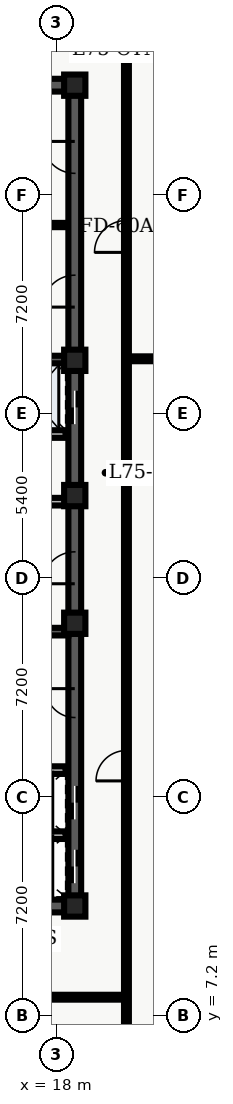
"""IFC4 building model, lengths in metres.
Left out: names, types, materials, properties, quantities, classifications, styles, units other than length and angle.
Written with IfcOpenShell. Run it as: python <this file> out.ifc"""

import sys

from ifc_helpers import new_model, entity, si_unit, converted_unit, direction, frame, origin_with_axes, origin_2d_with_axis, place, context, subcontext, project, spatial, polyline, rectangle, outline, extrude, element, fill, save


model = new_model("IFC4")
c1 = context("Model", 3, precision=1e-05, world=origin_with_axes(), true_north=direction((0.0, 1.0)))
c2 = subcontext(c1, "Body", "Model", "MODEL_VIEW")
j1 = project(units=[si_unit("LENGTHUNIT", "METRE"), converted_unit("PLANEANGLEUNIT", "DEGREE", entity("IfcPlaneAngleMeasure", 0.017), si_unit("PLANEANGLEUNIT", "RADIAN"), dimensions=[0, 0, 0, 0, 0, 0, 0])], contexts=[c1])
p1 = place(None, origin_with_axes())
s1 = spatial("IfcSite", under=j1, at=p1, CompositionType="ELEMENT")
p2 = place(p1, origin_with_axes())
s2 = spatial("IfcBuilding", under=s1, at=p2, CompositionType="ELEMENT")
p3 = place(p2, frame((0.0, 0.0, 303.6), z_axis=(0.0, 0.0, 1.0), x_axis=(1.0, 0.0, 0.0)))
s3 = spatial("IfcBuildingStorey", under=s2, at=p3, CompositionType="ELEMENT", Elevation=303.6)
p4 = place(p3, frame((11.4, 10.8, 0.0), z_axis=(0.0, 0.0, 1.0), x_axis=(1.0, 0.0, 0.0)))
e1 = element("IfcWall", 1, at=p4, inside=s3, PredefinedType="SHEAR", context=c2, shape_type="SweptSolid", body=[
    extrude(outline(polyline([(0.0, -0.21), (7.2, -0.21), (7.2, 0.21), (0.0, 0.21), (0.0, -0.21)])), origin_with_axes(), (0.0, 0.0, 1.0), 4.84),
])
p5 = place(p4, frame((2.625, 0.0, 0.0), z_axis=(0.0, 0.0, 1.0), x_axis=(1.0, 0.0, 0.0)))
e2 = element("IfcOpeningElement", 2, at=p5, cuts=e1, PredefinedType="OPENING", context=c2, shape_type="SweptSolid", body=[
    extrude(rectangle(XDim=1.05, YDim=0.44, at=origin_2d_with_axis()), origin_with_axes(), (0.0, 0.0, 1.0), 2.15),
])
p6 = place(p3, frame((11.4, 37.8, 0.0), z_axis=(0.0, 0.0, 1.0), x_axis=(1.0, 0.0, 0.0)))
e3 = element("IfcWall", 3, at=p6, inside=s3, PredefinedType="SHEAR", context=c2, shape_type="SweptSolid", body=[
    extrude(outline(polyline([(0.0, -0.21), (7.2, -0.21), (7.2, 0.21), (0.0, 0.21), (0.0, -0.21)])), origin_with_axes(), (0.0, 0.0, 1.0), 4.84),
])
p7 = place(p6, frame((2.625, 0.0, 0.0), z_axis=(0.0, 0.0, 1.0), x_axis=(1.0, 0.0, 0.0)))
e4 = element("IfcOpeningElement", 4, at=p7, cuts=e3, PredefinedType="OPENING", context=c2, shape_type="SweptSolid", body=[
    extrude(rectangle(XDim=1.05, YDim=0.44, at=origin_2d_with_axis()), origin_with_axes(), (0.0, 0.0, 1.0), 2.15),
])
p8 = place(p3, frame((18.6, 10.8, 0.0), z_axis=(0.0, 0.0, 1.0), x_axis=(0.0, 1.0, 0.0)))
e5 = element("IfcWall", 5, at=p8, inside=s3, PredefinedType="SHEAR", context=c2, shape_type="SweptSolid", body=[
    extrude(outline(polyline([(0.0, -0.21), (13.5, -0.21), (13.5, 0.21), (0.0, 0.21), (0.0, -0.21)])), origin_with_axes(), (0.0, 0.0, 1.0), 4.84),
])
p9 = place(p8, frame((1.3, 0.0, 0.0), z_axis=(0.0, 0.0, 1.0), x_axis=(1.0, 0.0, 0.0)))
e6 = element("IfcOpeningElement", 6, at=p9, cuts=e5, PredefinedType="OPENING", context=c2, shape_type="SweptSolid", body=[
    extrude(rectangle(XDim=1.1, YDim=0.44, at=origin_2d_with_axis()), origin_with_axes(), (0.0, 0.0, 1.0), 2.15),
])
p10 = place(p8, frame((3.4, 0.0, 0.0), z_axis=(0.0, 0.0, 1.0), x_axis=(1.0, 0.0, 0.0)))
e7 = element("IfcOpeningElement", 7, at=p10, cuts=e5, PredefinedType="OPENING", context=c2, shape_type="SweptSolid", body=[
    extrude(rectangle(XDim=1.1, YDim=0.44, at=origin_2d_with_axis()), origin_with_axes(), (0.0, 0.0, 1.0), 2.15),
])
p11 = place(p8, frame((11.125, 0.0, 0.0), z_axis=(0.0, 0.0, 1.0), x_axis=(1.0, 0.0, 0.0)))
e8 = element("IfcOpeningElement", 8, at=p11, cuts=e5, PredefinedType="OPENING", context=c2, shape_type="SweptSolid", body=[
    extrude(rectangle(XDim=1.05, YDim=0.44, at=origin_2d_with_axis()), origin_with_axes(), (0.0, 0.0, 1.0), 2.15),
])
p12 = place(p8, frame((6.675, 0.0, 0.0), z_axis=(0.0, 0.0, 1.0), x_axis=(1.0, 0.0, 0.0)))
e9 = element("IfcOpeningElement", 9, at=p12, cuts=e5, PredefinedType="OPENING", context=c2, shape_type="SweptSolid", body=[
    extrude(rectangle(XDim=0.95, YDim=0.44, at=origin_2d_with_axis()), origin_with_axes(), (0.0, 0.0, 1.0), 2.15),
])
p13 = place(p3, frame((18.6, 24.3, 0.0), z_axis=(0.0, 0.0, 1.0), x_axis=(0.0, 1.0, 0.0)))
e10 = element("IfcWall", 10, at=p13, inside=s3, PredefinedType="SHEAR", context=c2, shape_type="SweptSolid", body=[
    extrude(outline(polyline([(0.0, -0.21), (13.5, -0.21), (13.5, 0.21), (0.0, 0.21), (0.0, -0.21)])), origin_with_axes(), (0.0, 0.0, 1.0), 4.84),
])
p14 = place(p13, frame((2.9, 0.0, 0.0), z_axis=(0.0, 0.0, 1.0), x_axis=(1.0, 0.0, 0.0)))
e11 = element("IfcOpeningElement", 11, at=p14, cuts=e10, PredefinedType="OPENING", context=c2, shape_type="SweptSolid", body=[
    extrude(rectangle(XDim=1.1, YDim=0.44, at=origin_2d_with_axis()), origin_with_axes(), (0.0, 0.0, 1.0), 2.15),
])
p15 = place(p13, frame((6.725, 0.0, 0.0), z_axis=(0.0, 0.0, 1.0), x_axis=(1.0, 0.0, 0.0)))
e12 = element("IfcOpeningElement", 12, at=p15, cuts=e10, PredefinedType="OPENING", context=c2, shape_type="SweptSolid", body=[
    extrude(rectangle(XDim=1.05, YDim=0.44, at=origin_2d_with_axis()), origin_with_axes(), (0.0, 0.0, 1.0), 2.15),
])
p16 = place(p13, frame((11.125, 0.0, 0.0), z_axis=(0.0, 0.0, 1.0), x_axis=(1.0, 0.0, 0.0)))
e13 = element("IfcOpeningElement", 13, at=p16, cuts=e10, PredefinedType="OPENING", context=c2, shape_type="SweptSolid", body=[
    extrude(rectangle(XDim=1.05, YDim=0.44, at=origin_2d_with_axis()), origin_with_axes(), (0.0, 0.0, 1.0), 2.15),
])
for number, where, z_axis, x_axis in (
    (14, (11.61, 19.825, 0.0), (0.0, 0.0, 1.0), (1.0, 0.0, 0.0)),
    (15, (11.61, 28.775, 0.0), (0.0, 0.0, 1.0), (1.0, 0.0, 0.0)),
):
    element("IfcWall", number, at=place(p3, frame(where, z_axis=z_axis, x_axis=x_axis)), inside=s3, PredefinedType="SHEAR", context=c2, shape_type="SweptSolid", body=[
        extrude(outline(polyline([(0.0, -0.125), (6.78, -0.125), (6.78, 0.125), (0.0, 0.125), (0.0, -0.125)])), origin_with_axes(), (0.0, 0.0, 1.0), 4.84),
    ])
p17 = place(p3, frame((11.7, 24.1, 0.0), z_axis=(0.0, 0.0, 1.0), x_axis=(1.0, 0.0, 0.0)))
e16 = element("IfcWall", 16, at=p17, inside=s3, PredefinedType="SOLIDWALL", context=c2, shape_type="SweptSolid", body=[
    extrude(outline(polyline([(0.0, -0.125), (6.6, -0.125), (6.6, 0.125), (0.0, 0.125), (0.0, -0.125)])), origin_with_axes(), (0.0, 0.0, 1.0), 3.6),
])
p18 = place(p17, frame((3.6, 0.0, 0.0), z_axis=(0.0, 0.0, 1.0), x_axis=(1.0, 0.0, 0.0)))
e17 = element("IfcOpeningElement", 17, at=p18, cuts=e16, PredefinedType="OPENING", context=c2, shape_type="SweptSolid", body=[
    extrude(rectangle(XDim=0.9, YDim=0.27, at=origin_2d_with_axis()), origin_with_axes(), (0.0, 0.0, 1.0), 2.15),
])
p19 = place(p17, frame((5.65, 0.0, 0.0), z_axis=(0.0, 0.0, 1.0), x_axis=(1.0, 0.0, 0.0)))
e18 = element("IfcOpeningElement", 18, at=p19, cuts=e16, PredefinedType="OPENING", context=c2, shape_type="SweptSolid", body=[
    extrude(rectangle(XDim=0.9, YDim=0.27, at=origin_2d_with_axis()), origin_with_axes(), (0.0, 0.0, 1.0), 2.15),
])
p20 = place(p3, frame((11.7, 26.325, 0.0), z_axis=(0.0, 0.0, 1.0), x_axis=(1.0, 0.0, 0.0)))
e19 = element("IfcWall", 19, at=p20, inside=s3, PredefinedType="SOLIDWALL", context=c2, shape_type="SweptSolid", body=[
    extrude(outline(polyline([(0.0, -0.125), (6.6, -0.125), (6.6, 0.125), (0.0, 0.125), (0.0, -0.125)])), origin_with_axes(), (0.0, 0.0, 1.0), 3.6),
])
p21 = place(p20, frame((3.5, 0.0, 0.0), z_axis=(0.0, 0.0, 1.0), x_axis=(1.0, 0.0, 0.0)))
e20 = element("IfcOpeningElement", 20, at=p21, cuts=e19, PredefinedType="OPENING", context=c2, shape_type="SweptSolid", body=[
    extrude(rectangle(XDim=0.9, YDim=0.27, at=origin_2d_with_axis()), origin_with_axes(), (0.0, 0.0, 1.0), 2.15),
])
for number, where, z_axis, x_axis in (
    (21, (18.6, 10.8, 0.0), (0.0, 0.0, 1.0), (1.0, 0.0, 0.0)),
    (22, (18.6, 20.1, 0.0), (0.0, 0.0, 1.0), (1.0, 0.0, 0.0)),
    (23, (18.6, 24.3, 0.0), (0.0, 0.0, 1.0), (1.0, 0.0, 0.0)),
    (24, (18.6, 28.75, 0.0), (0.0, 0.0, 1.0), (1.0, 0.0, 0.0)),
    (25, (18.6, 37.8, 0.0), (0.0, 0.0, 1.0), (1.0, 0.0, 0.0)),
):
    element("IfcColumn", number, at=place(p3, frame(where, z_axis=z_axis, x_axis=x_axis)), inside=s3, PredefinedType="COLUMN", context=c2, shape_type="SweptSolid", body=[
        extrude(rectangle(XDim=0.7, YDim=0.7, at=origin_2d_with_axis()), origin_with_axes(), (0.0, 0.0, 1.0), 5.1),
    ])
for number, where, z_axis, x_axis in (
    (26, (15.84, 13.13, 0.0), (0.0, 0.0, 1.0), (1.0, 0.0, 0.0)),
    (27, (15.84, 15.27, 0.0), (0.0, 0.0, 1.0), (1.0, 0.0, 0.0)),
):
    element("IfcWall", number, at=place(p3, frame(where, z_axis=z_axis, x_axis=x_axis)), inside=s3, PredefinedType="SOLIDWALL", context=c2, shape_type="SweptSolid", body=[
        extrude(outline(polyline([(0.0, -0.125), (2.46, -0.125), (2.46, 0.125), (0.0, 0.125), (0.0, -0.125)])), origin_with_axes(), (0.0, 0.0, 1.0), 3.2),
    ])
p22 = place(p3, frame((15.84, 33.2, 0.0), z_axis=(0.0, 0.0, 1.0), x_axis=(1.0, 0.0, 0.0)))
e28 = element("IfcWall", 28, at=p22, inside=s3, PredefinedType="PARTITIONING", context=c2, shape_type="SweptSolid", body=[
    extrude(outline(polyline([(0.0, -0.07), (2.46, -0.07), (2.46, 0.07), (0.0, 0.07), (0.0, -0.07)])), origin_with_axes(), (0.0, 0.0, 1.0), 3.2),
])
p23 = place(p3, frame((8.135, 7.8, 0.0), z_axis=(0.0, 0.0, 1.0), x_axis=(1.0, 0.0, 0.0)))
e29 = element("IfcWall", 29, at=p23, inside=s3, PredefinedType="PARTITIONING", context=c2, shape_type="SweptSolid", body=[
    extrude(outline(polyline([(0.0, -0.08), (12.165, -0.08), (12.165, 0.08), (0.0, 0.08), (0.0, -0.08)])), origin_with_axes(), (0.0, 0.0, 1.0), 3.2),
])
p24 = place(p23, frame((6.065, 0.0, 0.0), z_axis=(0.0, 0.0, 1.0), x_axis=(1.0, 0.0, 0.0)))
e30 = element("IfcOpeningElement", 30, at=p24, cuts=e29, PredefinedType="OPENING", context=c2, shape_type="SweptSolid", body=[
    extrude(rectangle(XDim=1.0, YDim=0.18, at=origin_2d_with_axis()), origin_with_axes(), (0.0, 0.0, 1.0), 2.15),
])
p25 = place(p3, frame((20.3, 2.14, 0.0), z_axis=(0.0, 0.0, 1.0), x_axis=(0.0, 1.0, 0.0)))
e31 = element("IfcWall", 31, at=p25, inside=s3, PredefinedType="PARTITIONING", context=c2, shape_type="SweptSolid", body=[
    extrude(outline(polyline([(0.0, -0.08), (38.36, -0.08), (38.36, 0.08), (0.0, 0.08), (0.0, -0.08)])), origin_with_axes(), (0.0, 0.0, 1.0), 3.2),
])
p26 = place(p25, frame((30.685, 0.0, 0.0), z_axis=(0.0, 0.0, 1.0), x_axis=(1.0, 0.0, 0.0)))
e32 = element("IfcOpeningElement", 32, at=p26, cuts=e31, PredefinedType="OPENING", context=c2, shape_type="SweptSolid", body=[
    extrude(rectangle(XDim=1.05, YDim=0.18, at=origin_2d_with_axis()), origin_with_axes(), (0.0, 0.0, 1.0), 2.15),
])
p27 = place(p25, frame((13.275, 0.0, 0.0), z_axis=(0.0, 0.0, 1.0), x_axis=(1.0, 0.0, 0.0)))
e33 = element("IfcOpeningElement", 33, at=p27, cuts=e31, PredefinedType="OPENING", context=c2, shape_type="SweptSolid", body=[
    extrude(rectangle(XDim=1.0, YDim=0.18, at=origin_2d_with_axis()), origin_with_axes(), (0.0, 0.0, 1.0), 2.15),
])
p28 = place(p3, frame((20.3, 28.8, 0.0), z_axis=(0.0, 0.0, 1.0), x_axis=(1.0, 0.0, 0.0)))
e34 = element("IfcWall", 34, at=p28, inside=s3, PredefinedType="PARTITIONING", context=c2, shape_type="SweptSolid", body=[
    extrude(outline(polyline([(0.0, -0.08), (3.32, -0.08), (3.32, 0.08), (0.0, 0.08), (0.0, -0.08)])), origin_with_axes(), (0.0, 0.0, 1.0), 3.2),
])
p29 = place(p8, frame((1.3, 0.0, 0.0), z_axis=(0.0, 0.0, 1.0), x_axis=(1.0, 0.0, 0.0)))
e35 = element("IfcDoor", 35, at=p29, inside=s3, OperationType="SLIDING_TO_LEFT", PredefinedType="DOOR", context=c2, shape_type="SweptSolid", body=[
    extrude(rectangle(XDim=1.1, YDim=0.09, at=origin_2d_with_axis()), origin_with_axes(), (0.0, 0.0, 1.0), 2.15),
])
fill(e6, e35)
p30 = place(p8, frame((3.4, 0.0, 0.0), z_axis=(0.0, 0.0, 1.0), x_axis=(1.0, 0.0, 0.0)))
e36 = element("IfcDoor", 36, at=p30, inside=s3, OperationType="SLIDING_TO_RIGHT", PredefinedType="DOOR", context=c2, shape_type="SweptSolid", body=[
    extrude(rectangle(XDim=1.1, YDim=0.09, at=origin_2d_with_axis()), origin_with_axes(), (0.0, 0.0, 1.0), 2.15),
])
fill(e7, e36)
p31 = place(p13, frame((2.9, 0.0, 0.0), z_axis=(0.0, 0.0, 1.0), x_axis=(1.0, 0.0, 0.0)))
e37 = element("IfcDoor", 37, at=p31, inside=s3, OperationType="DOUBLE_DOOR_SLIDING", PredefinedType="DOOR", context=c2, shape_type="SweptSolid", body=[
    extrude(rectangle(XDim=1.1, YDim=0.09, at=origin_2d_with_axis()), origin_with_axes(), (0.0, 0.0, 1.0), 2.15),
])
fill(e11, e37)
p32 = place(p8, frame((11.125, 0.0, 0.0), z_axis=(0.0, 0.0, 1.0), x_axis=(1.0, 0.0, 0.0)))
e38 = element("IfcDoor", 38, at=p32, inside=s3, OperationType="SINGLE_SWING_LEFT", PredefinedType="DOOR", context=c2, shape_type="SweptSolid", body=[
    extrude(rectangle(XDim=1.05, YDim=0.09, at=origin_2d_with_axis()), origin_with_axes(), (0.0, 0.0, 1.0), 2.15),
])
fill(e8, e38)
p33 = place(p8, frame((6.675, 0.0, 0.0), z_axis=(0.0, 0.0, 1.0), x_axis=(1.0, 0.0, 0.0)))
e39 = element("IfcDoor", 39, at=p33, inside=s3, OperationType="SINGLE_SWING_RIGHT", PredefinedType="DOOR", context=c2, shape_type="SweptSolid", body=[
    extrude(rectangle(XDim=0.95, YDim=0.09, at=origin_2d_with_axis()), origin_with_axes(), (0.0, 0.0, 1.0), 2.15),
])
fill(e9, e39)
p34 = place(p13, frame((6.725, 0.0, 0.0), z_axis=(0.0, 0.0, 1.0), x_axis=(1.0, 0.0, 0.0)))
e40 = element("IfcDoor", 40, at=p34, inside=s3, OperationType="SINGLE_SWING_LEFT", PredefinedType="DOOR", context=c2, shape_type="SweptSolid", body=[
    extrude(rectangle(XDim=1.05, YDim=0.09, at=origin_2d_with_axis()), origin_with_axes(), (0.0, 0.0, 1.0), 2.15),
])
fill(e12, e40)
p35 = place(p13, frame((11.125, 0.0, 0.0), z_axis=(0.0, 0.0, 1.0), x_axis=(1.0, 0.0, 0.0)))
e41 = element("IfcDoor", 41, at=p35, inside=s3, OperationType="SINGLE_SWING_RIGHT", PredefinedType="DOOR", context=c2, shape_type="SweptSolid", body=[
    extrude(rectangle(XDim=1.05, YDim=0.09, at=origin_2d_with_axis()), origin_with_axes(), (0.0, 0.0, 1.0), 2.15),
])
fill(e13, e41)
p36 = place(p25, frame((30.685, 0.0, 0.0), z_axis=(0.0, 0.0, 1.0), x_axis=(1.0, 0.0, 0.0)))
e42 = element("IfcDoor", 42, at=p36, inside=s3, OperationType="SINGLE_SWING_LEFT", PredefinedType="DOOR", context=c2, shape_type="SweptSolid", body=[
    extrude(rectangle(XDim=1.05, YDim=0.09, at=origin_2d_with_axis()), origin_with_axes(), (0.0, 0.0, 1.0), 2.15),
])
fill(e32, e42)
p37 = place(p25, frame((13.275, 0.0, 0.0), z_axis=(0.0, 0.0, 1.0), x_axis=(1.0, 0.0, 0.0)))
e43 = element("IfcDoor", 43, at=p37, inside=s3, OperationType="SINGLE_SWING_LEFT", PredefinedType="DOOR", context=c2, shape_type="SweptSolid", body=[
    extrude(rectangle(XDim=1.0, YDim=0.09, at=origin_2d_with_axis()), origin_with_axes(), (0.0, 0.0, 1.0), 2.15),
])
fill(e33, e43)
save(model, sys.argv[1])
